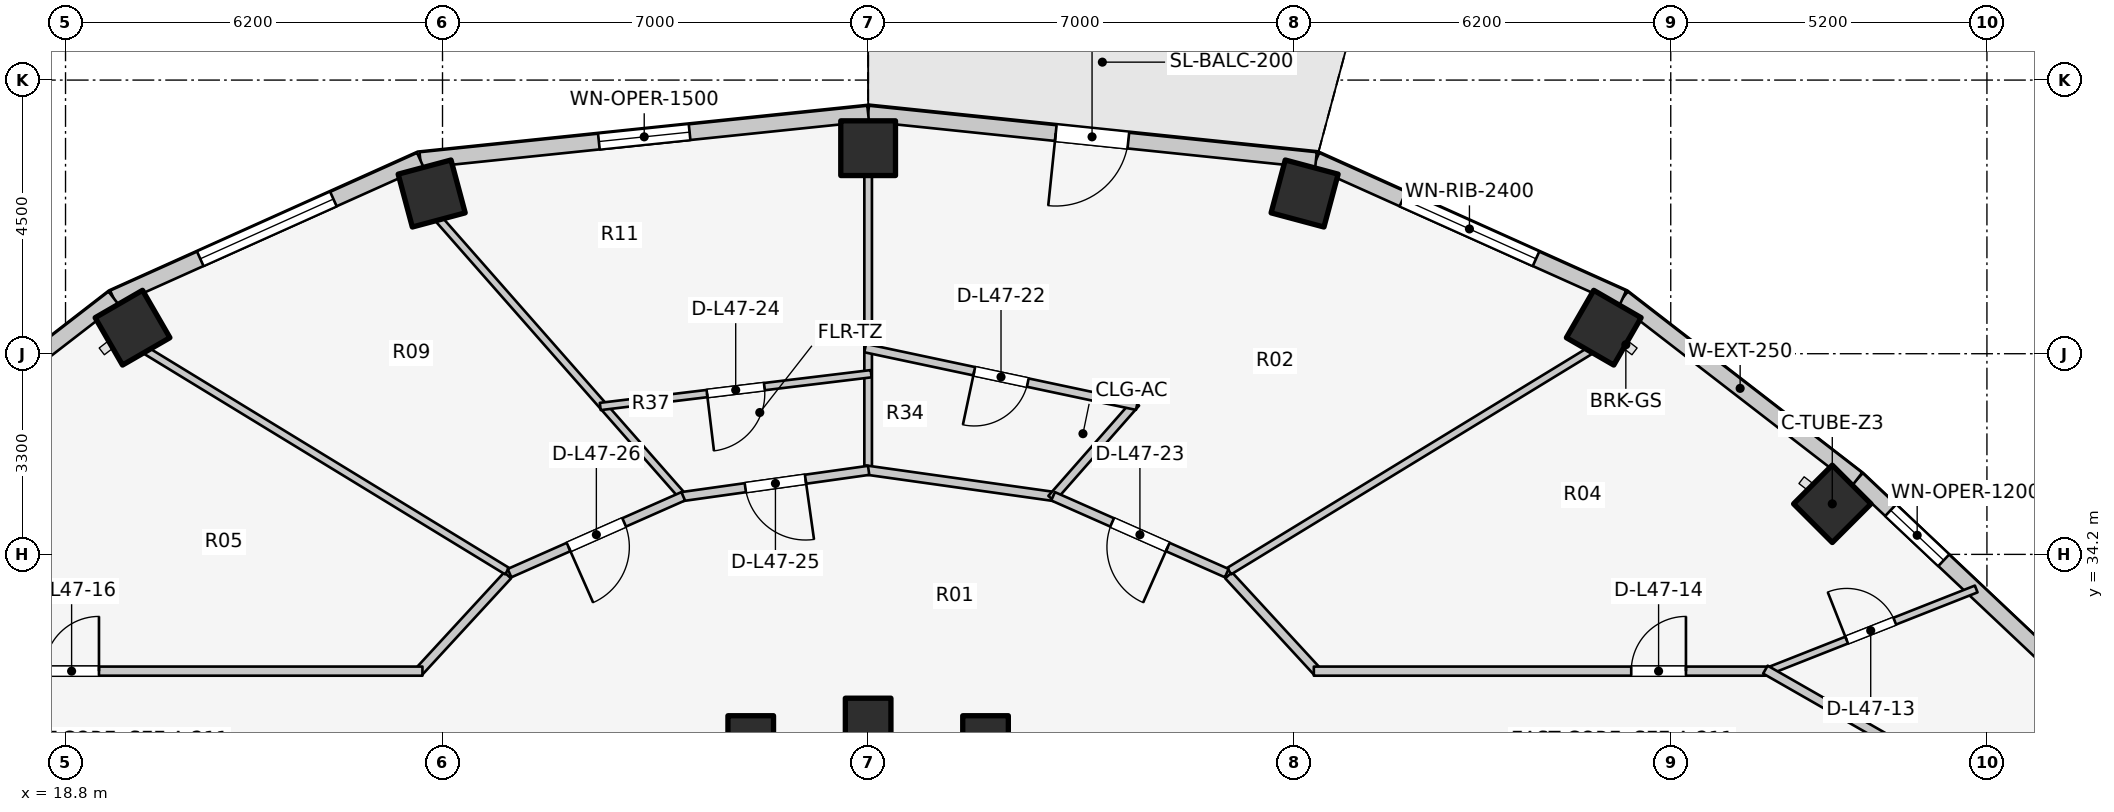
"""IFC4 building model, lengths in metres.
Left out: names, types, materials, properties, quantities, classifications, styles, units other than length and angle.
Written with IfcOpenShell. Run it as: python <this file> out.ifc"""

import sys

from ifc_helpers import new_model, si_unit, direction, frame, frame_2d, origin, origin_2d, place, context, subcontext, project, spatial, rectangle, extrude, element, fill, save


model = new_model("IFC4")
c1 = context("Model", 3, precision=1e-05, world=origin(), true_north=direction((0.0, 1.0)))
c2 = subcontext(c1, "Body", "Model", "MODEL_VIEW")
j1 = project(units=[si_unit("LENGTHUNIT", "METRE"), si_unit("PLANEANGLEUNIT", "RADIAN")], contexts=[c1])
p1 = place(None, origin())
s1 = spatial("IfcSite", under=j1, at=p1, CompositionType="ELEMENT")
p2 = place(p1, origin())
s2 = spatial("IfcBuilding", under=s1, at=p2, CompositionType="ELEMENT")
p3 = place(p2, frame((0.0, 0.0, 156.0)))
s3 = spatial("IfcBuildingStorey", under=s2, at=p3, CompositionType="ELEMENT", Elevation=156.0)
for number, where, z_axis, x_axis in (
    (1, (47.857, 35.031, 0.0), (0.0, 0.0, 1.0), (0.707, 0.707, 0.0)),
    (2, (44.098, 37.928, 0.0), (0.0, 0.0, 1.0), (0.5, 0.866, 0.0)),
):
    element("IfcColumn", number, at=place(p3, frame(where, z_axis=z_axis, x_axis=x_axis)), inside=s3, PredefinedType="COLUMN", context=c2, shape_type="SweptSolid", body=[
        extrude(rectangle(XDim=0.9, YDim=0.9, at=origin_2d()), origin(), (0.0, 0.0, 1.0), 3.1),
    ])
p4 = place(p3, frame((33.931, 31.172, 0.0), z_axis=(0.0, 0.0, 1.0), x_axis=(1.0, 0.0, 0.0)))
e3 = element("IfcColumn", 3, at=p4, inside=s3, PredefinedType="COLUMN", context=c2, shape_type="SweptSolid", body=[
    extrude(rectangle(XDim=0.75, YDim=0.75, at=origin_2d()), origin(), (0.0, 0.0, 1.0), 3.1),
])
p5 = place(p3, frame((39.178, 40.135, 0.0), z_axis=(0.0, 0.0, 1.0), x_axis=(0.258819045103, 0.965925826289, 0.0)))
e4 = element("IfcColumn", 4, at=p5, inside=s3, PredefinedType="COLUMN", context=c2, shape_type="SweptSolid", body=[
    extrude(rectangle(XDim=0.9, YDim=0.9, at=origin_2d()), origin(), (0.0, 0.0, 1.0), 3.1),
])
p6 = place(p3, frame((32.0, 31.46, 0.0), z_axis=(0.0, 0.0, 1.0), x_axis=(1.0, 0.0, 0.0)))
e5 = element("IfcColumn", 5, at=p6, inside=s3, PredefinedType="COLUMN", context=c2, shape_type="SweptSolid", body=[
    extrude(rectangle(XDim=0.75, YDim=0.75, at=origin_2d()), origin(), (0.0, 0.0, 1.0), 3.1),
])
p7 = place(p3, frame((32.0, 40.88, 0.0), z_axis=(0.0, 0.0, 1.0), x_axis=(0.0, 1.0, 0.0)))
e6 = element("IfcColumn", 6, at=p7, inside=s3, PredefinedType="COLUMN", context=c2, shape_type="SweptSolid", body=[
    extrude(rectangle(XDim=0.9, YDim=0.9, at=origin_2d()), origin(), (0.0, 0.0, 1.0), 3.1),
])
p8 = place(p3, frame((30.069, 31.172, 0.0), z_axis=(0.0, 0.0, 1.0), x_axis=(1.0, 0.0, 0.0)))
e7 = element("IfcColumn", 7, at=p8, inside=s3, PredefinedType="COLUMN", context=c2, shape_type="SweptSolid", body=[
    extrude(rectangle(XDim=0.75, YDim=0.75, at=origin_2d()), origin(), (0.0, 0.0, 1.0), 3.1),
])
for number, where, z_axis, x_axis in (
    (8, (24.822, 40.135, 0.0), (0.0, 0.0, 1.0), (-0.259, 0.966, 0.0)),
    (9, (19.902, 37.928, 0.0), (0.0, 0.0, 1.0), (-0.5, 0.866, 0.0)),
):
    element("IfcColumn", number, at=place(p3, frame(where, z_axis=z_axis, x_axis=x_axis)), inside=s3, PredefinedType="COLUMN", context=c2, shape_type="SweptSolid", body=[
        extrude(rectangle(XDim=0.9, YDim=0.9, at=origin_2d()), origin(), (0.0, 0.0, 1.0), 3.1),
    ])
p9 = place(p3, frame((51.619, 32.284, 0.0), z_axis=(0.0, 0.0, 1.0), x_axis=(-0.727667301037, 0.68593024354, 0.0)))
e10 = element("IfcWall", 10, at=p9, inside=s3, PredefinedType="STANDARD", context=c2, shape_type="SweptSolid", body=[
    extrude(rectangle(XDim=4.604, YDim=0.26, at=frame_2d((2.302, 0.0))), origin(), (0.0, 0.0, 1.0), 2.85),
])
p10 = place(p9, frame((2.652, 0.0, 0.75)))
e11 = element("IfcOpeningElement", 11, at=p10, cuts=e10, PredefinedType="OPENING", context=c2, shape_type="SweptSolid", body=[
    extrude(rectangle(XDim=1.2, YDim=1.5, at=frame_2d((0.6, 0.75))), frame((0.0, 0.14, 0.0), z_axis=(0.0, -1.0, 0.0), x_axis=(1.0, 0.0, 0.0)), (0.0, 0.0, 1.0), 0.28),
])
p11 = place(p3, frame((48.269, 35.441, 0.0), z_axis=(0.0, 0.0, 1.0), x_axis=(-0.791460185804, 0.611220724687, 0.0)))
e12 = element("IfcWall", 12, at=p11, inside=s3, PredefinedType="STANDARD", context=c2, shape_type="SweptSolid", body=[
    extrude(rectangle(XDim=4.872, YDim=0.26, at=frame_2d((2.436, 0.0))), origin(), (0.0, 0.0, 1.0), 2.85),
])
p12 = place(p3, frame((44.413, 38.419, 0.0), z_axis=(0.0, 0.0, 1.0), x_axis=(-0.912353637112, 0.409403029847, 0.0)))
e13 = element("IfcWall", 13, at=p12, inside=s3, PredefinedType="STANDARD", context=c2, shape_type="SweptSolid", body=[
    extrude(rectangle(XDim=5.533, YDim=0.26, at=frame_2d((2.766, 0.0))), origin(), (0.0, 0.0, 1.0), 2.85),
])
p13 = place(p12, frame((1.566, 0.0, 0.75)))
e14 = element("IfcOpeningElement", 14, at=p13, cuts=e13, PredefinedType="OPENING", context=c2, shape_type="SweptSolid", body=[
    extrude(rectangle(XDim=2.4, YDim=1.7, at=frame_2d((1.2, 0.85))), frame((0.0, 0.14, 0.0), z_axis=(0.0, -1.0, 0.0), x_axis=(1.0, 0.0, 0.0)), (0.0, 0.0, 1.0), 0.28),
])
p14 = place(p3, frame((39.365, 40.685, 0.0), z_axis=(0.0, 0.0, 1.0), x_axis=(-0.994664178965, 0.10316574569, 0.0)))
e15 = element("IfcWall", 15, at=p14, inside=s3, PredefinedType="STANDARD", context=c2, shape_type="SweptSolid", body=[
    extrude(rectangle(XDim=7.405, YDim=0.26, at=frame_2d((3.702, 0.0))), origin(), (0.0, 0.0, 1.0), 2.88),
])
p15 = place(p14, frame((3.102, 0.0, 0.0)))
e16 = element("IfcOpeningElement", 16, at=p15, cuts=e15, PredefinedType="OPENING", context=c2, shape_type="SweptSolid", body=[
    extrude(rectangle(XDim=1.2, YDim=2.2, at=frame_2d((0.6, 1.1))), frame((0.0, 0.14, 0.0), z_axis=(0.0, -1.0, 0.0), x_axis=(1.0, 0.0, 0.0)), (0.0, 0.0, 1.0), 0.28),
])
p16 = place(p3, frame((32.0, 41.448, 0.0), z_axis=(0.0, 0.0, 1.0), x_axis=(-0.994664178965, -0.10316574569, 0.0)))
e17 = element("IfcWall", 17, at=p16, inside=s3, PredefinedType="STANDARD", context=c2, shape_type="SweptSolid", body=[
    extrude(rectangle(XDim=7.405, YDim=0.26, at=frame_2d((3.702, 0.0))), origin(), (0.0, 0.0, 1.0), 2.85),
])
p17 = place(p16, frame((2.952, 0.0, 0.75)))
e18 = element("IfcOpeningElement", 18, at=p17, cuts=e17, PredefinedType="OPENING", context=c2, shape_type="SweptSolid", body=[
    extrude(rectangle(XDim=1.5, YDim=1.6, at=frame_2d((0.75, 0.8))), frame((0.0, 0.14, 0.0), z_axis=(0.0, -1.0, 0.0), x_axis=(1.0, 0.0, 0.0)), (0.0, 0.0, 1.0), 0.28),
])
p18 = place(p3, frame((24.635, 40.685, 0.0), z_axis=(0.0, 0.0, 1.0), x_axis=(-0.912353637112, -0.409403029847, 0.0)))
e19 = element("IfcWall", 19, at=p18, inside=s3, PredefinedType="STANDARD", context=c2, shape_type="SweptSolid", body=[
    extrude(rectangle(XDim=5.533, YDim=0.26, at=frame_2d((2.766, 0.0))), origin(), (0.0, 0.0, 1.0), 2.85),
])
p19 = place(p18, frame((1.566, 0.0, 0.75)))
e20 = element("IfcOpeningElement", 20, at=p19, cuts=e19, PredefinedType="OPENING", context=c2, shape_type="SweptSolid", body=[
    extrude(rectangle(XDim=2.4, YDim=1.7, at=frame_2d((1.2, 0.85))), frame((0.0, 0.14, 0.0), z_axis=(0.0, -1.0, 0.0), x_axis=(1.0, 0.0, 0.0)), (0.0, 0.0, 1.0), 0.28),
])
p20 = place(p3, frame((19.587, 38.419, 0.0), z_axis=(0.0, 0.0, 1.0), x_axis=(-0.791460185804, -0.611220724687, 0.0)))
e21 = element("IfcWall", 21, at=p20, inside=s3, PredefinedType="STANDARD", context=c2, shape_type="SweptSolid", body=[
    extrude(rectangle(XDim=4.872, YDim=0.26, at=frame_2d((2.436, 0.0))), origin(), (0.0, 0.0, 1.0), 2.85),
])
p21 = place(p3, frame((46.753, 32.262, 0.0), z_axis=(0.0, 0.0, 1.0), x_axis=(0.930204027108, 0.367042869367, 0.0)))
e22 = element("IfcWall", 22, at=p21, inside=s3, PredefinedType="MOVABLE", context=c2, shape_type="SweptSolid", body=[
    extrude(rectangle(XDim=3.731, YDim=0.12, at=frame_2d((1.865, 0.0))), origin(), (0.0, 0.0, 1.0), 2.22),
])
p22 = place(p21, frame((1.44, 0.0, 0.0)))
e23 = element("IfcOpeningElement", 23, at=p22, cuts=e22, PredefinedType="OPENING", context=c2, shape_type="SweptSolid", body=[
    extrude(rectangle(XDim=0.85, YDim=2.05, at=frame_2d((0.425, 1.025))), frame((0.0, 0.07, 0.0), z_axis=(0.0, -1.0, 0.0), x_axis=(1.0, 0.0, 0.0)), (0.0, 0.0, 1.0), 0.14),
])
p23 = place(p3, frame((37.928, 33.856, 0.0), z_axis=(0.0, 0.0, 1.0), x_axis=(0.677579737957, -0.735449317567, 0.0)))
e24 = element("IfcWall", 24, at=p23, inside=s3, PredefinedType="PARTITIONING", context=c2, shape_type="SweptSolid", body=[
    extrude(rectangle(XDim=2.173, YDim=0.15, at=frame_2d((1.086, 0.0))), origin(), (0.0, 0.0, 1.0), 2.299),
])
p24 = place(p3, frame((39.33, 32.28, 0.0), z_axis=(0.0, 0.0, 1.0), x_axis=(1.0, 0.0, 0.0)))
e25 = element("IfcWall", 25, at=p24, inside=s3, PredefinedType="PARTITIONING", context=c2, shape_type="SweptSolid", body=[
    extrude(rectangle(XDim=7.52, YDim=0.15, at=frame_2d((3.76, 0.0))), origin(), (0.0, 0.0, 1.0), 2.299),
])
p25 = place(p24, frame((5.22, 0.0, 0.0)))
e26 = element("IfcOpeningElement", 26, at=p25, cuts=e25, PredefinedType="OPENING", context=c2, shape_type="SweptSolid", body=[
    extrude(rectangle(XDim=0.9, YDim=2.1, at=frame_2d((0.45, 1.05))), frame((0.0, 0.085, 0.0), z_axis=(0.0, -1.0, 0.0), x_axis=(1.0, 0.0, 0.0)), (0.0, 0.0, 1.0), 0.17),
])
p26 = place(p3, frame((46.757, 32.305, 0.0), z_axis=(0.0, 0.0, 1.0), x_axis=(0.867991349648, -0.496579315857, 0.0)))
e27 = element("IfcWall", 27, at=p26, inside=s3, PredefinedType="PARTITIONING", context=c2, shape_type="SweptSolid", body=[
    extrude(rectangle(XDim=2.567, YDim=0.15, at=frame_2d((1.283, 0.0))), origin(), (0.0, 0.0, 1.0), 2.22),
])
p27 = place(p3, frame((26.072, 33.856, 0.0), z_axis=(0.0, 0.0, 1.0), x_axis=(-0.677579737957, -0.735449317567, 0.0)))
e28 = element("IfcWall", 28, at=p27, inside=s3, PredefinedType="PARTITIONING", context=c2, shape_type="SweptSolid", body=[
    extrude(rectangle(XDim=2.173, YDim=0.15, at=frame_2d((1.086, 0.0))), origin(), (0.0, 0.0, 1.0), 2.299),
])
p28 = place(p3, frame((17.15, 32.28, 0.0), z_axis=(0.0, 0.0, 1.0), x_axis=(1.0, 0.0, 0.0)))
e29 = element("IfcWall", 29, at=p28, inside=s3, PredefinedType="PARTITIONING", context=c2, shape_type="SweptSolid", body=[
    extrude(rectangle(XDim=7.52, YDim=0.15, at=frame_2d((3.76, 0.0))), origin(), (0.0, 0.0, 1.0), 2.299),
])
p29 = place(p28, frame((1.3, 0.0, 0.0)))
e30 = element("IfcOpeningElement", 30, at=p29, cuts=e29, PredefinedType="OPENING", context=c2, shape_type="SweptSolid", body=[
    extrude(rectangle(XDim=0.9, YDim=2.1, at=frame_2d((0.45, 1.05))), frame((0.0, 0.085, 0.0), z_axis=(0.0, -1.0, 0.0), x_axis=(1.0, 0.0, 0.0)), (0.0, 0.0, 1.0), 0.17),
])
p30 = place(p3, frame((37.938, 33.925, 0.0), z_axis=(0.0, 0.0, 1.0), x_axis=(0.853440334679, 0.521190555501, 0.0)))
e31 = element("IfcWall", 31, at=p30, inside=s3, PredefinedType="PARTITIONING", context=c2, shape_type="SweptSolid", body=[
    extrude(rectangle(XDim=6.966, YDim=0.125, at=frame_2d((3.483, 0.0))), origin(), (0.0, 0.0, 1.0), 2.299),
])
p31 = place(p3, frame((32.0, 35.637, 0.0), z_axis=(0.0, 0.0, 1.0), x_axis=(0.0, 1.0, 0.0)))
e32 = element("IfcWall", 32, at=p31, inside=s3, PredefinedType="PARTITIONING", context=c2, shape_type="SweptSolid", body=[
    extrude(rectangle(XDim=4.813, YDim=0.125, at=frame_2d((2.406, 0.0))), origin(), (0.0, 0.0, 1.0), 2.299),
])
p32 = place(p3, frame((28.914, 35.195, 0.0), z_axis=(0.0, 0.0, 1.0), x_axis=(-0.660581320981, 0.750754499401, 0.0)))
e33 = element("IfcWall", 33, at=p32, inside=s3, PredefinedType="PARTITIONING", context=c2, shape_type="SweptSolid", body=[
    extrude(rectangle(XDim=6.027, YDim=0.125, at=frame_2d((3.013, 0.0))), origin(), (0.0, 0.0, 1.0), 2.299),
])
p33 = place(p3, frame((26.062, 33.925, 0.0), z_axis=(0.0, 0.0, 1.0), x_axis=(-0.853440334679, 0.521190555501, 0.0)))
e34 = element("IfcWall", 34, at=p33, inside=s3, PredefinedType="PARTITIONING", context=c2, shape_type="SweptSolid", body=[
    extrude(rectangle(XDim=6.966, YDim=0.125, at=frame_2d((3.483, 0.0))), origin(), (0.0, 0.0, 1.0), 2.299),
])
p34 = place(p3, frame((35.099, 35.146, 0.0), z_axis=(0.0, 0.0, 1.0), x_axis=(-0.990251283702, 0.139292480508, 0.0)))
e35 = element("IfcWall", 35, at=p34, inside=s3, PredefinedType="PARTITIONING", context=c2, shape_type="SweptSolid", body=[
    extrude(rectangle(XDim=3.179, YDim=0.15, at=frame_2d((1.59, 0.0))), origin(), (0.0, 0.0, 1.0), 2.299),
])
p35 = place(p3, frame((35.016, 35.116, 0.0), z_axis=(0.0, 0.0, 1.0), x_axis=(0.660559753652, 0.750773475727, 0.0)))
e36 = element("IfcWall", 36, at=p35, inside=s3, PredefinedType="PLUMBINGWALL", context=c2, shape_type="SweptSolid", body=[
    extrude(rectangle(XDim=2.1, YDim=0.14, at=frame_2d((1.05, 0.0))), origin(), (0.0, 0.0, 1.0), 2.385),
])
p36 = place(p3, frame((36.419, 36.644, 0.0), z_axis=(0.0, 0.0, 1.0), x_axis=(-0.978225905005, 0.20754295646, 0.0)))
e37 = element("IfcWall", 37, at=p36, inside=s3, PredefinedType="PLUMBINGWALL", context=c2, shape_type="SweptSolid", body=[
    extrude(rectangle(XDim=4.568, YDim=0.14, at=frame_2d((2.284, 0.0))), origin(), (0.0, 0.0, 1.0), 2.299),
])
p37 = place(p36, frame((1.834, 0.0, 0.0)))
e38 = element("IfcOpeningElement", 38, at=p37, cuts=e37, PredefinedType="OPENING", context=c2, shape_type="SweptSolid", body=[
    extrude(rectangle(XDim=0.9, YDim=2.1, at=frame_2d((0.45, 1.05))), frame((0.0, 0.08, 0.0), z_axis=(0.0, -1.0, 0.0), x_axis=(1.0, 0.0, 0.0)), (0.0, 0.0, 1.0), 0.16),
])
p38 = place(p3, frame((37.898, 33.892, 0.0), z_axis=(0.0, 0.0, 1.0), x_axis=(-0.914519212393, 0.40454247016, 0.0)))
e39 = element("IfcWall", 39, at=p38, inside=s3, PredefinedType="PARTITIONING", context=c2, shape_type="SweptSolid", body=[
    extrude(rectangle(XDim=3.124, YDim=0.15, at=frame_2d((1.562, 0.0))), origin(), (0.0, 0.0, 1.0), 2.299),
])
p39 = place(p38, frame((1.062, 0.0, 0.0)))
e40 = element("IfcOpeningElement", 40, at=p39, cuts=e39, PredefinedType="OPENING", context=c2, shape_type="SweptSolid", body=[
    extrude(rectangle(XDim=1.0, YDim=2.1, at=frame_2d((0.5, 1.05))), frame((0.0, 0.085, 0.0), z_axis=(0.0, -1.0, 0.0), x_axis=(1.0, 0.0, 0.0)), (0.0, 0.0, 1.0), 0.17),
])
p40 = place(p3, frame((32.05, 37.171, 0.0), z_axis=(0.0, 0.0, 1.0), x_axis=(-0.992759753087, -0.120116912424, 0.0)))
e41 = element("IfcWall", 41, at=p40, inside=s3, PredefinedType="MOVABLE", context=c2, shape_type="SweptSolid", body=[
    extrude(rectangle(XDim=4.488, YDim=0.12, at=frame_2d((2.244, 0.0))), origin(), (0.0, 0.0, 1.0), 2.299),
])
p41 = place(p40, frame((1.769, 0.0, 0.0)))
e42 = element("IfcOpeningElement", 42, at=p41, cuts=e41, PredefinedType="OPENING", context=c2, shape_type="SweptSolid", body=[
    extrude(rectangle(XDim=0.95, YDim=2.1, at=frame_2d((0.475, 1.05))), frame((0.0, 0.07, 0.0), z_axis=(0.0, -1.0, 0.0), x_axis=(1.0, 0.0, 0.0)), (0.0, 0.0, 1.0), 0.14),
])
p42 = place(p3, frame((32.008, 35.582, 0.0), z_axis=(0.0, 0.0, 1.0), x_axis=(-0.990254709652, -0.13926812274, 0.0)))
e43 = element("IfcWall", 43, at=p42, inside=s3, PredefinedType="PARTITIONING", context=c2, shape_type="SweptSolid", body=[
    extrude(rectangle(XDim=3.096, YDim=0.15, at=frame_2d((1.548, 0.0))), origin(), (0.0, 0.0, 1.0), 2.299),
])
p43 = place(p42, frame((1.048, 0.0, 0.0)))
e44 = element("IfcOpeningElement", 44, at=p43, cuts=e43, PredefinedType="OPENING", context=c2, shape_type="SweptSolid", body=[
    extrude(rectangle(XDim=1.0, YDim=2.1, at=frame_2d((0.5, 1.05))), frame((0.0, 0.085, 0.0), z_axis=(0.0, -1.0, 0.0), x_axis=(1.0, 0.0, 0.0)), (0.0, 0.0, 1.0), 0.17),
])
p44 = place(p3, frame((28.958, 35.156, 0.0), z_axis=(0.0, 0.0, 1.0), x_axis=(-0.914519212393, -0.40454247016, 0.0)))
e45 = element("IfcWall", 45, at=p44, inside=s3, PredefinedType="PARTITIONING", context=c2, shape_type="SweptSolid", body=[
    extrude(rectangle(XDim=3.124, YDim=0.15, at=frame_2d((1.562, 0.0))), origin(), (0.0, 0.0, 1.0), 2.299),
])
p45 = place(p44, frame((1.062, 0.0, 0.0)))
e46 = element("IfcOpeningElement", 46, at=p45, cuts=e45, PredefinedType="OPENING", context=c2, shape_type="SweptSolid", body=[
    extrude(rectangle(XDim=1.0, YDim=2.1, at=frame_2d((0.5, 1.05))), frame((0.0, 0.085, 0.0), z_axis=(0.0, -1.0, 0.0), x_axis=(1.0, 0.0, 0.0)), (0.0, 0.0, 1.0), 0.17),
])
p46 = place(p10, origin())
e47 = element("IfcWindow", 47, at=p46, inside=s3, PartitioningType="SINGLE_PANEL", PredefinedType="WINDOW", context=c2, shape_type="SweptSolid", body=[
    extrude(rectangle(XDim=1.2, YDim=1.5, at=frame_2d((0.6, 0.75))), frame((0.0, 0.03, 0.0), z_axis=(0.0, -1.0, 0.0), x_axis=(1.0, 0.0, 0.0)), (0.0, 0.0, 1.0), 0.06),
])
fill(e11, e47)
p47 = place(p13, origin())
e48 = element("IfcWindow", 48, at=p47, inside=s3, PartitioningType="SINGLE_PANEL", PredefinedType="WINDOW", context=c2, shape_type="SweptSolid", body=[
    extrude(rectangle(XDim=2.4, YDim=1.7, at=frame_2d((1.2, 0.85))), frame((0.0, 0.03, 0.0), z_axis=(0.0, -1.0, 0.0), x_axis=(1.0, 0.0, 0.0)), (0.0, 0.0, 1.0), 0.06),
])
fill(e14, e48)
p48 = place(p15, origin())
e49 = element("IfcDoor", 49, at=p48, inside=s3, OperationType="SINGLE_SWING_RIGHT", PredefinedType="DOOR", context=c2, shape_type="SweptSolid", body=[
    extrude(rectangle(XDim=1.2, YDim=2.2, at=frame_2d((0.6, 1.1))), frame((0.0, 0.025, 0.0), z_axis=(0.0, -1.0, 0.0), x_axis=(1.0, 0.0, 0.0)), (0.0, 0.0, 1.0), 0.05),
])
fill(e16, e49)
p49 = place(p17, origin())
e50 = element("IfcWindow", 50, at=p49, inside=s3, PartitioningType="SINGLE_PANEL", PredefinedType="WINDOW", context=c2, shape_type="SweptSolid", body=[
    extrude(rectangle(XDim=1.5, YDim=1.6, at=frame_2d((0.75, 0.8))), frame((0.0, 0.03, 0.0), z_axis=(0.0, -1.0, 0.0), x_axis=(1.0, 0.0, 0.0)), (0.0, 0.0, 1.0), 0.06),
])
fill(e18, e50)
p50 = place(p19, origin())
e51 = element("IfcWindow", 51, at=p50, inside=s3, PartitioningType="SINGLE_PANEL", PredefinedType="WINDOW", context=c2, shape_type="SweptSolid", body=[
    extrude(rectangle(XDim=2.4, YDim=1.7, at=frame_2d((1.2, 0.85))), frame((0.0, 0.03, 0.0), z_axis=(0.0, -1.0, 0.0), x_axis=(1.0, 0.0, 0.0)), (0.0, 0.0, 1.0), 0.06),
])
fill(e20, e51)
p51 = place(p22, origin())
e52 = element("IfcDoor", 52, at=p51, inside=s3, OperationType="SINGLE_SWING_LEFT", PredefinedType="DOOR", context=c2, shape_type="SweptSolid", body=[
    extrude(rectangle(XDim=0.85, YDim=2.05, at=frame_2d((0.425, 1.025))), frame((0.0, 0.025, 0.0), z_axis=(0.0, -1.0, 0.0), x_axis=(1.0, 0.0, 0.0)), (0.0, 0.0, 1.0), 0.05),
])
fill(e23, e52)
p52 = place(p25, origin())
e53 = element("IfcDoor", 53, at=p52, inside=s3, OperationType="SINGLE_SWING_RIGHT", PredefinedType="DOOR", context=c2, shape_type="SweptSolid", body=[
    extrude(rectangle(XDim=0.9, YDim=2.1, at=frame_2d((0.45, 1.05))), frame((0.0, 0.025, 0.0), z_axis=(0.0, -1.0, 0.0), x_axis=(1.0, 0.0, 0.0)), (0.0, 0.0, 1.0), 0.05),
])
fill(e26, e53)
p53 = place(p29, origin())
e54 = element("IfcDoor", 54, at=p53, inside=s3, OperationType="SINGLE_SWING_RIGHT", PredefinedType="DOOR", context=c2, shape_type="SweptSolid", body=[
    extrude(rectangle(XDim=0.9, YDim=2.1, at=frame_2d((0.45, 1.05))), frame((0.0, 0.025, 0.0), z_axis=(0.0, -1.0, 0.0), x_axis=(1.0, 0.0, 0.0)), (0.0, 0.0, 1.0), 0.05),
])
fill(e30, e54)
p54 = place(p37, origin())
e55 = element("IfcDoor", 55, at=p54, inside=s3, OperationType="SINGLE_SWING_RIGHT", PredefinedType="DOOR", context=c2, shape_type="SweptSolid", body=[
    extrude(rectangle(XDim=0.9, YDim=2.1, at=frame_2d((0.45, 1.05))), frame((0.0, 0.025, 0.0), z_axis=(0.0, -1.0, 0.0), x_axis=(1.0, 0.0, 0.0)), (0.0, 0.0, 1.0), 0.05),
])
fill(e38, e55)
p55 = place(p39, origin())
e56 = element("IfcDoor", 56, at=p55, inside=s3, OperationType="SINGLE_SWING_LEFT", PredefinedType="DOOR", context=c2, shape_type="SweptSolid", body=[
    extrude(rectangle(XDim=1.0, YDim=2.1, at=frame_2d((0.5, 1.05))), frame((0.0, 0.025, 0.0), z_axis=(0.0, -1.0, 0.0), x_axis=(1.0, 0.0, 0.0)), (0.0, 0.0, 1.0), 0.05),
])
fill(e40, e56)
p56 = place(p41, origin())
e57 = element("IfcDoor", 57, at=p56, inside=s3, OperationType="SINGLE_SWING_RIGHT", PredefinedType="DOOR", context=c2, shape_type="SweptSolid", body=[
    extrude(rectangle(XDim=0.95, YDim=2.1, at=frame_2d((0.475, 1.05))), frame((0.0, 0.025, 0.0), z_axis=(0.0, -1.0, 0.0), x_axis=(1.0, 0.0, 0.0)), (0.0, 0.0, 1.0), 0.05),
])
fill(e42, e57)
p57 = place(p43, origin())
e58 = element("IfcDoor", 58, at=p57, inside=s3, OperationType="SINGLE_SWING_LEFT", PredefinedType="DOOR", context=c2, shape_type="SweptSolid", body=[
    extrude(rectangle(XDim=1.0, YDim=2.1, at=frame_2d((0.5, 1.05))), frame((0.0, 0.025, 0.0), z_axis=(0.0, -1.0, 0.0), x_axis=(1.0, 0.0, 0.0)), (0.0, 0.0, 1.0), 0.05),
])
fill(e44, e58)
p58 = place(p45, origin())
e59 = element("IfcDoor", 59, at=p58, inside=s3, OperationType="SINGLE_SWING_RIGHT", PredefinedType="DOOR", context=c2, shape_type="SweptSolid", body=[
    extrude(rectangle(XDim=1.0, YDim=2.1, at=frame_2d((0.5, 1.05))), frame((0.0, 0.025, 0.0), z_axis=(0.0, -1.0, 0.0), x_axis=(1.0, 0.0, 0.0)), (0.0, 0.0, 1.0), 0.05),
])
fill(e46, e59)
save(model, sys.argv[1])
